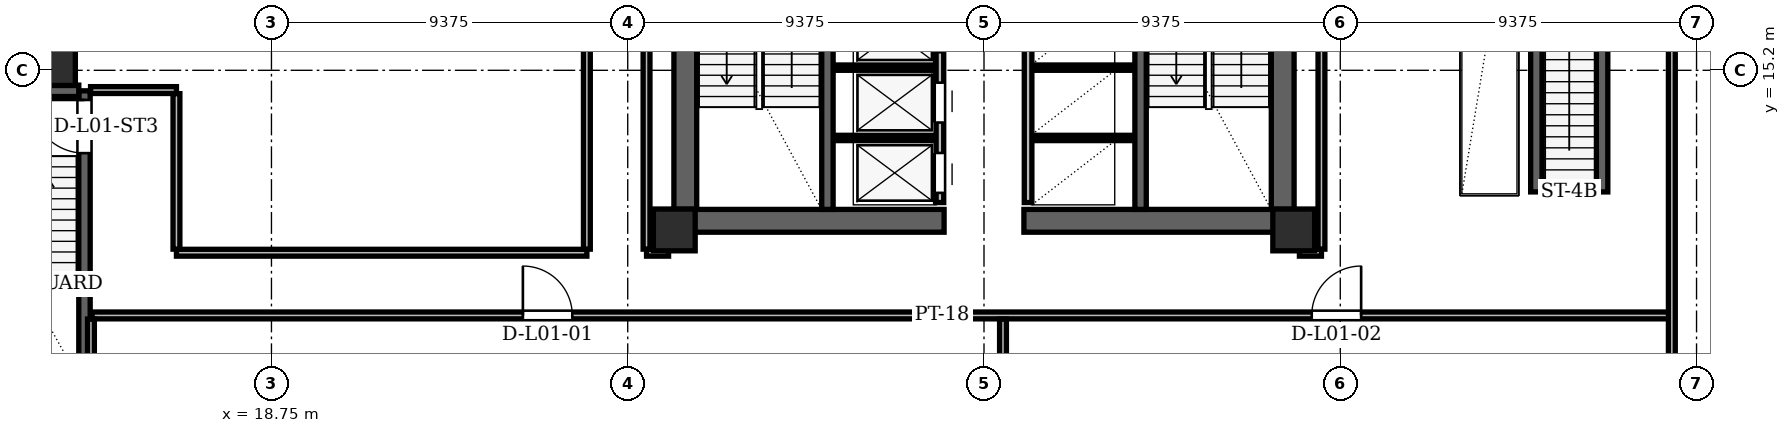
"""IFC4 building model, lengths in metres.
Left out: names, types, materials, properties, quantities, classifications, styles, units other than length and angle.
Written with IfcOpenShell. Run it as: python <this file> out.ifc"""

import sys

from ifc_helpers import new_model, si_unit, direction, frame, frame_2d, origin, origin_2d, place, context, subcontext, project, spatial, rectangle, hollow_rectangle, extrude, element, fill, save


model = new_model("IFC4")
c1 = context("Model", 3, precision=1e-05, world=origin(), true_north=direction((0.0, 1.0)))
c2 = subcontext(c1, "Body", "Model", "MODEL_VIEW")
j1 = project(units=[si_unit("LENGTHUNIT", "METRE"), si_unit("PLANEANGLEUNIT", "RADIAN")], contexts=[c1])
p1 = place(None, origin())
s1 = spatial("IfcSite", under=j1, at=p1, CompositionType="ELEMENT")
p2 = place(p1, origin())
s2 = spatial("IfcBuilding", under=s1, at=p2, CompositionType="ELEMENT")
p3 = place(p2, frame((0.0, 0.0, 5.4)))
s3 = spatial("IfcBuildingStorey", under=s2, at=p3, CompositionType="ELEMENT", Elevation=5.4)
for number, where, z_axis, x_axis in (
    (1, (29.35, 11.0, 0.0), (0.0, 0.0, 1.0), (1.0, 0.0, 0.0)),
    (2, (45.65, 11.0, 0.0), (0.0, 0.0, 1.0), (1.0, 0.0, 0.0)),
):
    element("IfcColumn", number, at=place(p3, frame(where, z_axis=z_axis, x_axis=x_axis)), inside=s3, PredefinedType="COLUMN", context=c2, shape_type="SweptSolid", body=[
        extrude(hollow_rectangle(XDim=1.1, YDim=1.1, WallThickness=0.09, at=origin_2d()), origin(), (0.0, 0.0, 1.0), 4.5),
    ])
p4 = place(p3, frame((13.09, 15.3, 0.005), z_axis=(0.0, 0.0, 1.0), x_axis=(1.0, 0.0, 0.0)))
e3 = element("IfcColumn", 3, at=p4, inside=s3, PredefinedType="COLUMN", context=c2, shape_type="SweptSolid", body=[
    extrude(hollow_rectangle(XDim=1.0, YDim=1.0, WallThickness=0.085, at=origin_2d()), origin(), (0.0, 0.0, 1.0), 4.491),
])
for number, where, z_axis, x_axis in (
    (4, (29.64, 11.0, 0.0), (0.0, 0.0, 1.0), (0.0, 1.0, 0.0)),
    (5, (45.36, 11.0, 0.0), (0.0, 0.0, 1.0), (0.0, 1.0, 0.0)),
):
    element("IfcWall", number, at=place(p3, frame(where, z_axis=z_axis, x_axis=x_axis)), inside=s3, PredefinedType="SHEAR", context=c2, shape_type="SweptSolid", body=[
        extrude(rectangle(XDim=13.3, YDim=0.6, at=frame_2d((6.65, 0.0))), origin(), (0.0, 0.0, 1.0), 4.22),
    ])
for number, where, z_axis, x_axis in (
    (6, (29.35, 11.24, 0.0), (0.0, 0.0, 1.0), (1.0, 0.0, 0.0)),
    (7, (38.55, 11.24, 0.0), (0.0, 0.0, 1.0), (1.0, 0.0, 0.0)),
):
    element("IfcWall", number, at=place(p3, frame(where, z_axis=z_axis, x_axis=x_axis)), inside=s3, PredefinedType="SHEAR", context=c2, shape_type="SweptSolid", body=[
        extrude(rectangle(XDim=7.1, YDim=0.6, at=frame_2d((3.55, 0.0))), origin(), (0.0, 0.0, 1.0), 4.22),
    ])
for number, where, z_axis, x_axis in (
    (8, (33.38, 11.54, 0.0), (0.0, 0.0, 1.0), (0.0, 1.0, 0.0)),
    (9, (41.62, 11.54, 0.0), (0.0, 0.0, 1.0), (0.0, 1.0, 0.0)),
):
    element("IfcWall", number, at=place(p3, frame(where, z_axis=z_axis, x_axis=x_axis)), inside=s3, PredefinedType="SHEAR", context=c2, shape_type="SweptSolid", body=[
        extrude(rectangle(XDim=7.62, YDim=0.3, at=frame_2d((3.81, 0.0))), origin(), (0.0, 0.0, 1.0), 4.22),
    ])
p5 = place(p3, frame((13.83, 6.94, 0.0), z_axis=(0.0, 0.0, 1.0), x_axis=(0.0, 1.0, 0.0)))
e10 = element("IfcWall", 10, at=p5, inside=s3, PredefinedType="SHEAR", context=c2, shape_type="SweptSolid", body=[
    extrude(rectangle(XDim=7.72, YDim=0.3, at=frame_2d((3.86, 0.0))), origin(), (0.0, 0.0, 1.0), 4.22),
])
p6 = place(p5, frame((6.08, 0.0, 0.0)))
e11 = element("IfcOpeningElement", 11, at=p6, cuts=e10, PredefinedType="OPENING", context=c2, shape_type="SweptSolid", body=[
    extrude(rectangle(XDim=1.4, YDim=2.2, at=frame_2d((0.7, 1.1))), frame((0.0, 0.15, 0.0), z_axis=(0.0, -1.0, 0.0), x_axis=(1.0, 0.0, 0.0)), (0.0, 0.0, 1.0), 0.3),
])
p7 = place(p3, frame((10.39, 14.66, 0.0), z_axis=(0.0, 0.0, 1.0), x_axis=(1.0, 0.0, 0.0)))
e12 = element("IfcWall", 12, at=p7, inside=s3, PredefinedType="SHEAR", context=c2, shape_type="SweptSolid", body=[
    extrude(rectangle(XDim=3.29, YDim=0.3, at=frame_2d((1.645, 0.0))), origin(), (0.0, 0.0, 1.0), 4.22),
])
for number, where, z_axis, x_axis in (
    (13, (52.035, 12.0, 0.0), (0.0, 0.0, 1.0), (0.0, 1.0, 0.0)),
    (14, (53.765, 12.0, 0.0), (0.0, 0.0, 1.0), (0.0, 1.0, 0.0)),
):
    element("IfcWall", number, at=place(p3, frame(where, z_axis=z_axis, x_axis=x_axis)), inside=s3, PredefinedType="SHEAR", context=c2, shape_type="SweptSolid", body=[
        extrude(rectangle(XDim=7.25, YDim=0.3, at=frame_2d((3.625, 0.0))), origin(), (0.0, 0.0, 1.0), 4.22),
    ])
p8 = place(p3, frame((36.34, 11.72, 0.0), z_axis=(0.0, 0.0, 1.0), x_axis=(0.0, 1.0, 0.0)))
e15 = element("IfcWall", 15, at=p8, inside=s3, PredefinedType="PARTITIONING", context=c2, shape_type="SweptSolid", body=[
    extrude(rectangle(XDim=7.6, YDim=0.2, at=frame_2d((3.8, 0.0))), origin(), (0.0, 0.0, 1.0), 4.22),
])
p9 = place(p8, frame((0.255, 0.0, 0.0)))
e16 = element("IfcOpeningElement", 16, at=p9, cuts=e15, PredefinedType="OPENING", context=c2, shape_type="SweptSolid", body=[
    extrude(rectangle(XDim=1.05, YDim=2.15, at=frame_2d((0.525, 1.075))), frame((0.0, 0.1, 0.0), z_axis=(0.0, -1.0, 0.0), x_axis=(1.0, 0.0, 0.0)), (0.0, 0.0, 1.0), 0.2),
])
p10 = place(p8, frame((2.105, 0.0, 0.0)))
e17 = element("IfcOpeningElement", 17, at=p10, cuts=e15, PredefinedType="OPENING", context=c2, shape_type="SweptSolid", body=[
    extrude(rectangle(XDim=1.05, YDim=2.15, at=frame_2d((0.525, 1.075))), frame((0.0, 0.1, 0.0), z_axis=(0.0, -1.0, 0.0), x_axis=(1.0, 0.0, 0.0)), (0.0, 0.0, 1.0), 0.2),
])
p11 = place(p8, frame((3.955, 0.0, 0.0)))
e18 = element("IfcOpeningElement", 18, at=p11, cuts=e15, PredefinedType="OPENING", context=c2, shape_type="SweptSolid", body=[
    extrude(rectangle(XDim=1.05, YDim=2.15, at=frame_2d((0.525, 1.075))), frame((0.0, 0.1, 0.0), z_axis=(0.0, -1.0, 0.0), x_axis=(1.0, 0.0, 0.0)), (0.0, 0.0, 1.0), 0.2),
])
for number, where, z_axis, x_axis in (
    (19, (33.56, 13.42, 0.0), (0.0, 0.0, 1.0), (1.0, 0.0, 0.0)),
    (20, (33.56, 15.27, 0.0), (0.0, 0.0, 1.0), (1.0, 0.0, 0.0)),
):
    element("IfcWall", number, at=place(p3, frame(where, z_axis=z_axis, x_axis=x_axis)), inside=s3, PredefinedType="PARTITIONING", context=c2, shape_type="SweptSolid", body=[
        extrude(rectangle(XDim=2.66, YDim=0.14, at=frame_2d((1.33, 0.0))), origin(), (0.0, 0.0, 1.0), 4.22),
    ])
p12 = place(p3, frame((38.66, 11.72, 0.0), z_axis=(0.0, 0.0, 1.0), x_axis=(0.0, 1.0, 0.0)))
e21 = element("IfcWall", 21, at=p12, inside=s3, PredefinedType="PARTITIONING", context=c2, shape_type="SweptSolid", body=[
    extrude(rectangle(XDim=9.1, YDim=0.2, at=frame_2d((4.55, 0.0))), origin(), (0.0, 0.0, 1.0), 4.22),
])
for number, where, z_axis, x_axis in (
    (22, (38.78, 13.42, 0.0), (0.0, 0.0, 1.0), (1.0, 0.0, 0.0)),
    (23, (38.78, 15.27, 0.0), (0.0, 0.0, 1.0), (1.0, 0.0, 0.0)),
):
    element("IfcWall", number, at=place(p3, frame(where, z_axis=z_axis, x_axis=x_axis)), inside=s3, PredefinedType="PARTITIONING", context=c2, shape_type="SweptSolid", body=[
        extrude(rectangle(XDim=2.66, YDim=0.14, at=frame_2d((1.33, 0.0))), origin(), (0.0, 0.0, 1.0), 4.22),
    ])
p13 = place(p3, frame((14.03, 8.75, 0.0), z_axis=(0.0, 0.0, 1.0), x_axis=(1.0, 0.0, 0.0)))
e24 = element("IfcWall", 24, at=p13, inside=s3, PredefinedType="PARTITIONING", context=c2, shape_type="SweptSolid", body=[
    extrude(rectangle(XDim=41.57, YDim=0.18, at=frame_2d((20.785, 0.0))), origin(), (0.0, 0.0, 1.0), 3.283),
])
p14 = place(p13, frame((11.336, 0.0, 0.0)))
e25 = element("IfcOpeningElement", 25, at=p14, cuts=e24, PredefinedType="OPENING", context=c2, shape_type="SweptSolid", body=[
    extrude(rectangle(XDim=1.3, YDim=2.2, at=frame_2d((0.65, 1.1))), frame((0.0, 0.09, 0.0), z_axis=(0.0, -1.0, 0.0), x_axis=(1.0, 0.0, 0.0)), (0.0, 0.0, 1.0), 0.18),
])
p15 = place(p13, frame((32.094, 0.0, 0.0)))
e26 = element("IfcOpeningElement", 26, at=p15, cuts=e24, PredefinedType="OPENING", context=c2, shape_type="SweptSolid", body=[
    extrude(rectangle(XDim=1.3, YDim=2.2, at=frame_2d((0.65, 1.1))), frame((0.0, 0.09, 0.0), z_axis=(0.0, -1.0, 0.0), x_axis=(1.0, 0.0, 0.0)), (0.0, 0.0, 1.0), 0.18),
])
p16 = place(p3, frame((16.25, 10.4, 0.0), z_axis=(0.0, 0.0, 1.0), x_axis=(1.0, 0.0, 0.0)))
e27 = element("IfcWall", 27, at=p16, inside=s3, PredefinedType="PARTITIONING", context=c2, shape_type="SweptSolid", body=[
    extrude(rectangle(XDim=10.8, YDim=0.18, at=frame_2d((5.4, 0.0))), origin(), (0.0, 0.0, 1.0), 4.22),
])
for number, where, z_axis, x_axis in (
    (28, (28.62, 10.4, 0.0), (0.0, 0.0, 1.0), (1.0, 0.0, 0.0)),
    (29, (45.8, 10.4, 0.0), (0.0, 0.0, 1.0), (1.0, 0.0, 0.0)),
):
    element("IfcWall", number, at=place(p3, frame(where, z_axis=z_axis, x_axis=x_axis)), inside=s3, PredefinedType="PARTITIONING", context=c2, shape_type="SweptSolid", body=[
        extrude(rectangle(XDim=0.58, YDim=0.18, at=frame_2d((0.29, 0.0))), origin(), (0.0, 0.0, 1.0), 3.283),
    ])
p17 = place(p3, frame((13.99, 14.68, 0.0), z_axis=(0.0, 0.0, 1.0), x_axis=(1.0, 0.0, 0.0)))
e30 = element("IfcWall", 30, at=p17, inside=s3, PredefinedType="PARTITIONING", context=c2, shape_type="SweptSolid", body=[
    extrude(rectangle(XDim=2.26, YDim=0.18, at=frame_2d((1.13, 0.0))), origin(), (0.0, 0.0, 1.0), 3.283),
])
p18 = place(p3, frame((14.0, 1.644, 0.0), z_axis=(0.0, 0.0, 1.0), x_axis=(0.0, 1.0, 0.0)))
e31 = element("IfcWall", 31, at=p18, inside=s3, PredefinedType="PARTITIONING", context=c2, shape_type="SweptSolid", body=[
    extrude(rectangle(XDim=7.012, YDim=0.18, at=frame_2d((3.506, 0.0))), origin(), (0.0, 0.0, 1.0), 4.22),
])
p19 = place(p3, frame((16.25, 10.494, 0.0), z_axis=(0.0, 0.0, 1.0), x_axis=(0.0, 1.0, 0.0)))
e32 = element("IfcWall", 32, at=p19, inside=s3, PredefinedType="PARTITIONING", context=c2, shape_type="SweptSolid", body=[
    extrude(rectangle(XDim=4.092, YDim=0.18, at=frame_2d((2.046, 0.0))), origin(), (0.0, 0.0, 1.0), 3.283),
])
p20 = place(p3, frame((27.05, 10.494, 0.0), z_axis=(0.0, 0.0, 1.0), x_axis=(0.0, 1.0, 0.0)))
e33 = element("IfcWall", 33, at=p20, inside=s3, PredefinedType="PARTITIONING", context=c2, shape_type="SweptSolid", body=[
    extrude(rectangle(XDim=28.386, YDim=0.18, at=frame_2d((14.193, 0.0))), origin(), (0.0, 0.0, 1.0), 3.283),
])
p21 = place(p20, frame((5.985, 0.0, 0.0)))
e34 = element("IfcOpeningElement", 34, at=p21, cuts=e33, PredefinedType="OPENING", context=c2, shape_type="SweptSolid", body=[
    extrude(rectangle(XDim=1.3, YDim=2.2, at=frame_2d((0.65, 1.1))), frame((0.0, 0.09, 0.0), z_axis=(0.0, -1.0, 0.0), x_axis=(1.0, 0.0, 0.0)), (0.0, 0.0, 1.0), 0.18),
])
p22 = place(p3, frame((28.62, 10.494, 0.0), z_axis=(0.0, 0.0, 1.0), x_axis=(0.0, 1.0, 0.0)))
e35 = element("IfcWall", 35, at=p22, inside=s3, PredefinedType="PARTITIONING", context=c2, shape_type="SweptSolid", body=[
    extrude(rectangle(XDim=14.162, YDim=0.18, at=frame_2d((7.081, 0.0))), origin(), (0.0, 0.0, 1.0), 3.283),
])
p23 = place(p3, frame((38.0, 1.564, 0.0), z_axis=(0.0, 0.0, 1.0), x_axis=(0.0, 1.0, 0.0)))
e36 = element("IfcWall", 36, at=p23, inside=s3, PredefinedType="PARTITIONING", context=c2, shape_type="SweptSolid", body=[
    extrude(rectangle(XDim=7.092, YDim=0.18, at=frame_2d((3.546, 0.0))), origin(), (0.0, 0.0, 1.0), 4.22),
])
p24 = place(p3, frame((46.38, 10.494, 0.0), z_axis=(0.0, 0.0, 1.0), x_axis=(0.0, 1.0, 0.0)))
e37 = element("IfcWall", 37, at=p24, inside=s3, PredefinedType="PARTITIONING", context=c2, shape_type="SweptSolid", body=[
    extrude(rectangle(XDim=14.162, YDim=0.18, at=frame_2d((7.081, 0.0))), origin(), (0.0, 0.0, 1.0), 4.22),
])
p25 = place(p3, frame((55.6, 1.644, 0.0), z_axis=(0.0, 0.0, 1.0), x_axis=(0.0, 1.0, 0.0)))
e38 = element("IfcWall", 38, at=p25, inside=s3, PredefinedType="PARTITIONING", context=c2, shape_type="SweptSolid", body=[
    extrude(rectangle(XDim=42.312, YDim=0.18, at=frame_2d((21.156, 0.0))), origin(), (0.0, 0.0, 1.0), 3.01),
])
p26 = place(p25, frame((14.835, 0.0, 0.0)))
e39 = element("IfcOpeningElement", 39, at=p26, cuts=e38, PredefinedType="OPENING", context=c2, shape_type="SweptSolid", body=[
    extrude(rectangle(XDim=1.3, YDim=2.2, at=frame_2d((0.65, 1.1))), frame((0.0, 0.09, 0.0), z_axis=(0.0, -1.0, 0.0), x_axis=(1.0, 0.0, 0.0)), (0.0, 0.0, 1.0), 0.18),
])
p27 = place(p9, origin())
e40 = element("IfcDoor", 40, at=p27, inside=s3, OperationType="SLIDING_TO_LEFT", PredefinedType="DOOR", context=c2, shape_type="SweptSolid", body=[
    extrude(rectangle(XDim=1.05, YDim=2.15, at=frame_2d((0.525, 1.075))), frame((0.0, 0.025, 0.0), z_axis=(0.0, -1.0, 0.0), x_axis=(1.0, 0.0, 0.0)), (0.0, 0.0, 1.0), 0.05),
])
fill(e16, e40)
p28 = place(p10, origin())
e41 = element("IfcDoor", 41, at=p28, inside=s3, OperationType="SLIDING_TO_RIGHT", PredefinedType="DOOR", context=c2, shape_type="SweptSolid", body=[
    extrude(rectangle(XDim=1.05, YDim=2.15, at=frame_2d((0.525, 1.075))), frame((0.0, 0.025, 0.0), z_axis=(0.0, -1.0, 0.0), x_axis=(1.0, 0.0, 0.0)), (0.0, 0.0, 1.0), 0.05),
])
fill(e17, e41)
p29 = place(p11, origin())
e42 = element("IfcDoor", 42, at=p29, inside=s3, OperationType="SLIDING_TO_LEFT", PredefinedType="DOOR", context=c2, shape_type="SweptSolid", body=[
    extrude(rectangle(XDim=1.05, YDim=2.15, at=frame_2d((0.525, 1.075))), frame((0.0, 0.025, 0.0), z_axis=(0.0, -1.0, 0.0), x_axis=(1.0, 0.0, 0.0)), (0.0, 0.0, 1.0), 0.05),
])
fill(e18, e42)
p30 = place(p6, origin())
e43 = element("IfcDoor", 43, at=p30, inside=s3, OperationType="SINGLE_SWING_RIGHT", PredefinedType="DOOR", context=c2, shape_type="SweptSolid", body=[
    extrude(rectangle(XDim=1.4, YDim=2.2, at=frame_2d((0.7, 1.1))), frame((0.0, 0.025, 0.0), z_axis=(0.0, -1.0, 0.0), x_axis=(1.0, 0.0, 0.0)), (0.0, 0.0, 1.0), 0.05),
])
fill(e11, e43)
p31 = place(p14, origin())
e44 = element("IfcDoor", 44, at=p31, inside=s3, OperationType="SINGLE_SWING_LEFT", PredefinedType="DOOR", context=c2, shape_type="SweptSolid", body=[
    extrude(rectangle(XDim=1.3, YDim=2.2, at=frame_2d((0.65, 1.1))), frame((0.0, 0.025, 0.0), z_axis=(0.0, -1.0, 0.0), x_axis=(1.0, 0.0, 0.0)), (0.0, 0.0, 1.0), 0.05),
])
fill(e25, e44)
p32 = place(p15, origin())
e45 = element("IfcDoor", 45, at=p32, inside=s3, OperationType="SINGLE_SWING_RIGHT", PredefinedType="DOOR", context=c2, shape_type="SweptSolid", body=[
    extrude(rectangle(XDim=1.3, YDim=2.2, at=frame_2d((0.65, 1.1))), frame((0.0, 0.025, 0.0), z_axis=(0.0, -1.0, 0.0), x_axis=(1.0, 0.0, 0.0)), (0.0, 0.0, 1.0), 0.05),
])
fill(e26, e45)
save(model, sys.argv[1])
